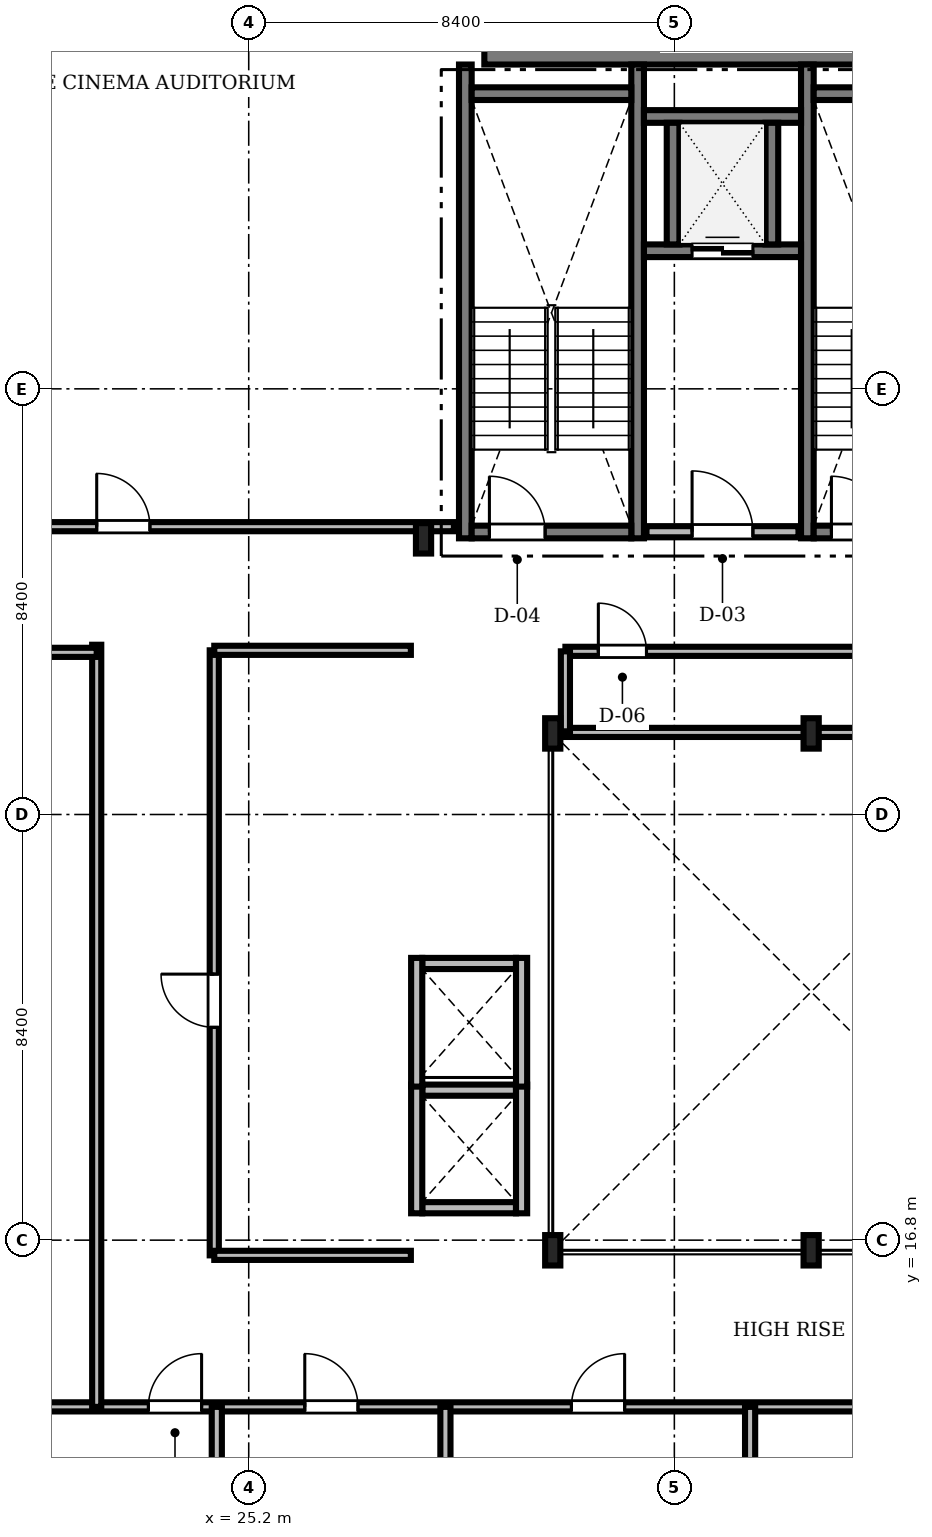
"""IFC4 building model, lengths in metres.
Left out: names, types, materials, properties, quantities, classifications, styles, units other than length and angle.
Written with IfcOpenShell. Run it as: python <this file> out.ifc"""

import sys

from ifc_helpers import new_model, si_unit, direction, frame, frame_2d, origin, origin_2d, place, context, subcontext, project, spatial, rectangle, i_section, extrude, source, transform, mapped, element, fill, save


model = new_model("IFC4")
c1 = context("Model", 3, precision=1e-05, world=origin(), true_north=direction((0.0, 1.0)))
c2 = subcontext(c1, "Body", "Model", "MODEL_VIEW")
j1 = project(units=[si_unit("LENGTHUNIT", "METRE"), si_unit("PLANEANGLEUNIT", "RADIAN")], contexts=[c1])
p1 = place(None, origin())
s1 = spatial("IfcSite", under=j1, at=p1, CompositionType="ELEMENT")
p2 = place(p1, origin())
s2 = spatial("IfcBuilding", under=s1, at=p2, CompositionType="ELEMENT")
p3 = place(p2, frame((0.0, 0.0, 246.65)))
s3 = spatial("IfcBuildingStorey", under=s2, at=p3, CompositionType="ELEMENT", Elevation=246.65)
m1 = source(origin(), c2, "Body", "SweptSolid", [
    extrude(rectangle(XDim=17.52, YDim=0.6, at=frame_2d((8.76, 0.0))), origin(), (0.0, 0.0, 1.0), 3.73),
])
p4 = place(p3, frame((29.85, 40.3, 0.0), z_axis=(0.0, 0.0, 1.0), x_axis=(1.0, 0.0, 0.0)))
e1 = element("IfcWall", 1, at=p4, inside=s3, PredefinedType="SHEAR", context=c2, shape_type="MappedRepresentation", body=[
    mapped(m1, transform((0.0, 0.0, 0.0), scale=1.0)),
])
m2 = source(origin(), c2, "Body", "SweptSolid", [
    extrude(i_section(OverallWidth=0.3, OverallDepth=0.6, WebThickness=0.015, FlangeThickness=0.03, FilletRadius=0.027, at=origin_2d()), origin(), (0.0, 0.0, 1.0), 3.73),
])
for number, where, z_axis, x_axis in (
    (2, (31.2, 16.6, 0.0), (0.0, 0.0, 1.0), (1.0, 0.0, 0.0)),
    (3, (36.3, 16.6, 0.0), (0.0, 0.0, 1.0), (1.0, 0.0, 0.0)),
    (4, (36.3, 26.8, 0.0), (0.0, 0.0, 1.0), (1.0, 0.0, 0.0)),
    (5, (31.2, 26.8, 0.0), (0.0, 0.0, 1.0), (1.0, 0.0, 0.0)),
    (6, (28.65, 30.65, 0.0), (0.0, 0.0, 1.0), (1.0, 0.0, 0.0)),
):
    element("IfcColumn", number, at=place(p3, frame(where, z_axis=z_axis, x_axis=x_axis)), inside=s3, PredefinedType="COLUMN", context=c2, shape_type="MappedRepresentation", body=[
        mapped(m2, transform((0.0, 0.0, 0.0), scale=1.0)),
    ])
m3 = source(origin(), c2, "Body", "SweptSolid", [
    extrude(rectangle(XDim=9.35, YDim=0.25, at=frame_2d((4.675, 0.0))), origin(), (0.0, 0.0, 1.0), 3.75),
])
for number, where, z_axis, x_axis in (
    (7, (29.475, 30.65, 0.0), (0.0, 0.0, 1.0), (0.0, 1.0, 0.0)),
    (8, (32.875, 30.65, 0.0), (0.0, 0.0, 1.0), (0.0, 1.0, 0.0)),
):
    element("IfcWall", number, at=place(p3, frame(where, z_axis=z_axis, x_axis=x_axis)), inside=s3, PredefinedType="SOLIDWALL", context=c2, shape_type="MappedRepresentation", body=[
        mapped(m3, transform((0.0, 0.0, 0.0), scale=1.0)),
    ])
m4 = source(origin(), c2, "Body", "SweptSolid", [
    extrude(rectangle(XDim=3.15, YDim=0.25, at=frame_2d((1.575, 0.0))), origin(), (0.0, 0.0, 1.0), 3.75),
])
p5 = place(p3, frame((29.6, 39.425, 0.0), z_axis=(0.0, 0.0, 1.0), x_axis=(1.0, 0.0, 0.0)))
e9 = element("IfcWall", 9, at=p5, inside=s3, PredefinedType="SOLIDWALL", context=c2, shape_type="MappedRepresentation", body=[
    mapped(m4, transform((0.0, 0.0, 0.0), scale=1.0)),
])
p6 = place(p3, frame((29.6, 30.775, 0.0), z_axis=(0.0, 0.0, 1.0), x_axis=(1.0, 0.0, 0.0)))
e10 = element("IfcWall", 10, at=p6, inside=s3, PredefinedType="SOLIDWALL", context=c2, shape_type="MappedRepresentation", body=[
    mapped(m4, transform((0.0, 0.0, 0.0), scale=1.0)),
])
m5 = source(origin(), c2, "Body", "SweptSolid", [
    extrude(rectangle(XDim=1.1, YDim=2.2, at=frame_2d((0.55, 1.1))), frame((0.0, 0.135, 0.0), z_axis=(0.0, -1.0, 0.0), x_axis=(1.0, 0.0, 0.0)), (0.0, 0.0, 1.0), 0.27),
])
p7 = place(p6, frame((0.35, 0.0, 0.0)))
e11 = element("IfcOpeningElement", 11, at=p7, cuts=e10, PredefinedType="OPENING", context=c2, shape_type="MappedRepresentation", body=[
    mapped(m5, transform((0.0, 0.0, 0.0), scale=1.0)),
])
p8 = place(p3, frame((36.225, 30.65, 0.0), z_axis=(0.0, 0.0, 1.0), x_axis=(0.0, 1.0, 0.0)))
e12 = element("IfcWall", 12, at=p8, inside=s3, PredefinedType="SOLIDWALL", context=c2, shape_type="MappedRepresentation", body=[
    mapped(m3, transform((0.0, 0.0, 0.0), scale=1.0)),
])
p9 = place(p3, frame((36.35, 39.425, 0.0), z_axis=(0.0, 0.0, 1.0), x_axis=(1.0, 0.0, 0.0)))
e13 = element("IfcWall", 13, at=p9, inside=s3, PredefinedType="SOLIDWALL", context=c2, shape_type="MappedRepresentation", body=[
    mapped(m4, transform((0.0, 0.0, 0.0), scale=1.0)),
])
p10 = place(p3, frame((36.35, 30.775, 0.0), z_axis=(0.0, 0.0, 1.0), x_axis=(1.0, 0.0, 0.0)))
e14 = element("IfcWall", 14, at=p10, inside=s3, PredefinedType="SOLIDWALL", context=c2, shape_type="MappedRepresentation", body=[
    mapped(m4, transform((0.0, 0.0, 0.0), scale=1.0)),
])
p11 = place(p10, frame((0.35, 0.0, 0.0)))
e15 = element("IfcOpeningElement", 15, at=p11, cuts=e14, PredefinedType="OPENING", context=c2, shape_type="MappedRepresentation", body=[
    mapped(m5, transform((0.0, 0.0, 0.0), scale=1.0)),
])
m6 = source(origin(), c2, "Body", "SweptSolid", [
    extrude(rectangle(XDim=3.0, YDim=0.22, at=frame_2d((1.5, 0.0))), origin(), (0.0, 0.0, 1.0), 3.73),
])
p12 = place(p3, frame((33.05, 30.78, 0.0), z_axis=(0.0, 0.0, 1.0), x_axis=(1.0, 0.0, 0.0)))
e16 = element("IfcWall", 16, at=p12, inside=s3, PredefinedType="SOLIDWALL", context=c2, shape_type="MappedRepresentation", body=[
    mapped(m6, transform((0.0, 0.0, 0.0), scale=1.0)),
])
m7 = source(origin(), c2, "Body", "SweptSolid", [
    extrude(rectangle(XDim=1.2, YDim=2.2, at=frame_2d((0.6, 1.1))), frame((0.0, 0.12, 0.0), z_axis=(0.0, -1.0, 0.0), x_axis=(1.0, 0.0, 0.0)), (0.0, 0.0, 1.0), 0.24),
])
p13 = place(p12, frame((0.9, 0.0, 0.0)))
e17 = element("IfcOpeningElement", 17, at=p13, cuts=e16, PredefinedType="OPENING", context=c2, shape_type="MappedRepresentation", body=[
    mapped(m7, transform((0.0, 0.0, 0.0), scale=1.0)),
])
m8 = source(origin(), c2, "Body", "SweptSolid", [
    extrude(rectangle(XDim=3.1, YDim=0.25, at=frame_2d((1.55, 0.0))), origin(), (0.0, 0.0, 1.0), 3.73),
])
p14 = place(p3, frame((33.0, 36.325, 0.0), z_axis=(0.0, 0.0, 1.0), x_axis=(1.0, 0.0, 0.0)))
e18 = element("IfcWall", 18, at=p14, inside=s3, PredefinedType="SOLIDWALL", context=c2, shape_type="MappedRepresentation", body=[
    mapped(m8, transform((0.0, 0.0, 0.0), scale=1.0)),
])
m9 = source(origin(), c2, "Body", "SweptSolid", [
    extrude(rectangle(XDim=1.2, YDim=2.25, at=frame_2d((0.6, 1.125))), frame((0.0, 0.135, 0.0), z_axis=(0.0, -1.0, 0.0), x_axis=(1.0, 0.0, 0.0)), (0.0, 0.0, 1.0), 0.27),
])
p15 = place(p14, frame((0.95, 0.0, 0.0)))
e19 = element("IfcOpeningElement", 19, at=p15, cuts=e18, PredefinedType="OPENING", context=c2, shape_type="MappedRepresentation", body=[
    mapped(m9, transform((0.0, 0.0, 0.0), scale=1.0)),
])
p16 = place(p3, frame((33.0, 38.975, 0.0), z_axis=(0.0, 0.0, 1.0), x_axis=(1.0, 0.0, 0.0)))
e20 = element("IfcWall", 20, at=p16, inside=s3, PredefinedType="SOLIDWALL", context=c2, shape_type="MappedRepresentation", body=[
    mapped(m8, transform((0.0, 0.0, 0.0), scale=1.0)),
])
m10 = source(origin(), c2, "Body", "SweptSolid", [
    extrude(rectangle(XDim=2.4, YDim=0.25, at=frame_2d((1.2, 0.0))), origin(), (0.0, 0.0, 1.0), 3.73),
])
for number, where, z_axis, x_axis in (
    (21, (33.575, 36.45, 0.0), (0.0, 0.0, 1.0), (0.0, 1.0, 0.0)),
    (22, (35.525, 36.45, 0.0), (0.0, 0.0, 1.0), (0.0, 1.0, 0.0)),
):
    element("IfcWall", number, at=place(p3, frame(where, z_axis=z_axis, x_axis=x_axis)), inside=s3, PredefinedType="SOLIDWALL", context=c2, shape_type="MappedRepresentation", body=[
        mapped(m10, transform((0.0, 0.0, 0.0), scale=1.0)),
    ])
m11 = source(origin(), c2, "Body", "SweptSolid", [
    extrude(rectangle(XDim=1.85, YDim=0.22, at=frame_2d((0.925, 0.0))), origin(), (0.0, 0.0, 1.0), 3.73),
])
for number, where, z_axis, x_axis in (
    (23, (28.625, 17.44, 0.0), (0.0, 0.0, 1.0), (1.0, 0.0, 0.0)),
    (24, (28.625, 19.76, 0.0), (0.0, 0.0, 1.0), (1.0, 0.0, 0.0)),
):
    element("IfcWall", number, at=place(p3, frame(where, z_axis=z_axis, x_axis=x_axis)), inside=s3, PredefinedType="SOLIDWALL", context=c2, shape_type="MappedRepresentation", body=[
        mapped(m11, transform((0.0, 0.0, 0.0), scale=1.0)),
    ])
m12 = source(origin(), c2, "Body", "SweptSolid", [
    extrude(rectangle(XDim=2.54, YDim=0.22, at=frame_2d((1.27, 0.0))), origin(), (0.0, 0.0, 1.0), 3.73),
])
for number, where, z_axis, x_axis in (
    (25, (28.515, 17.33, 0.0), (0.0, 0.0, 1.0), (0.0, 1.0, 0.0)),
    (26, (30.585, 17.33, 0.0), (0.0, 0.0, 1.0), (0.0, 1.0, 0.0)),
):
    element("IfcWall", number, at=place(p3, frame(where, z_axis=z_axis, x_axis=x_axis)), inside=s3, PredefinedType="SOLIDWALL", context=c2, shape_type="MappedRepresentation", body=[
        mapped(m12, transform((0.0, 0.0, 0.0), scale=1.0)),
    ])
p17 = place(p3, frame((28.625, 22.26, 0.0), z_axis=(0.0, 0.0, 1.0), x_axis=(1.0, 0.0, 0.0)))
e27 = element("IfcWall", 27, at=p17, inside=s3, PredefinedType="SOLIDWALL", context=c2, shape_type="MappedRepresentation", body=[
    mapped(m11, transform((0.0, 0.0, 0.0), scale=1.0)),
])
for number, where, z_axis, x_axis in (
    (28, (28.515, 19.83, 0.0), (0.0, 0.0, 1.0), (0.0, 1.0, 0.0)),
    (29, (30.585, 19.83, 0.0), (0.0, 0.0, 1.0), (0.0, 1.0, 0.0)),
):
    element("IfcWall", number, at=place(p3, frame(where, z_axis=z_axis, x_axis=x_axis)), inside=s3, PredefinedType="SOLIDWALL", context=c2, shape_type="MappedRepresentation", body=[
        mapped(m12, transform((0.0, 0.0, 0.0), scale=1.0)),
    ])
m13 = source(origin(), c2, "Body", "SweptSolid", [
    extrude(rectangle(XDim=46.156, YDim=0.18, at=frame_2d((23.078, 0.0))), origin(), (0.0, 0.0, 1.0), 2.972),
])
p18 = place(p3, frame((15.922, 13.51, 0.0), z_axis=(0.0, 0.0, 1.0), x_axis=(1.0, 0.0, 0.0)))
e30 = element("IfcWall", 30, at=p18, inside=s3, PredefinedType="PARTITIONING", context=c2, shape_type="MappedRepresentation", body=[
    mapped(m13, transform((0.0, 0.0, 0.0), scale=1.0)),
])
m14 = source(origin(), c2, "Body", "SweptSolid", [
    extrude(rectangle(XDim=1.05, YDim=2.2, at=frame_2d((0.525, 1.1))), frame((0.0, 0.1, 0.0), z_axis=(0.0, -1.0, 0.0), x_axis=(1.0, 0.0, 0.0)), (0.0, 0.0, 1.0), 0.2),
])
p19 = place(p18, frame((7.298, 0.0, 0.0)))
e31 = element("IfcOpeningElement", 31, at=p19, cuts=e30, PredefinedType="OPENING", context=c2, shape_type="MappedRepresentation", body=[
    mapped(m14, transform((0.0, 0.0, 0.0), scale=1.0)),
])
p20 = place(p18, frame((10.384, 0.0, 0.0)))
e32 = element("IfcOpeningElement", 32, at=p20, cuts=e30, PredefinedType="OPENING", context=c2, shape_type="MappedRepresentation", body=[
    mapped(m14, transform((0.0, 0.0, 0.0), scale=1.0)),
])
p21 = place(p18, frame((15.647, 0.0, 0.0)))
e33 = element("IfcOpeningElement", 33, at=p21, cuts=e30, PredefinedType="OPENING", context=c2, shape_type="MappedRepresentation", body=[
    mapped(m14, transform((0.0, 0.0, 0.0), scale=1.0)),
])
p22 = place(p18, frame((21.659, 0.0, 0.0)))
e34 = element("IfcOpeningElement", 34, at=p22, cuts=e30, PredefinedType="OPENING", context=c2, shape_type="MappedRepresentation", body=[
    mapped(m14, transform((0.0, 0.0, 0.0), scale=1.0)),
])
p23 = place(p18, frame((28.422, 0.0, 0.0)))
e35 = element("IfcOpeningElement", 35, at=p23, cuts=e30, PredefinedType="OPENING", context=c2, shape_type="MappedRepresentation", body=[
    mapped(m14, transform((0.0, 0.0, 0.0), scale=1.0)),
])
p24 = place(p18, frame((33.798, 0.0, 0.0)))
e36 = element("IfcOpeningElement", 36, at=p24, cuts=e30, PredefinedType="OPENING", context=c2, shape_type="MappedRepresentation", body=[
    mapped(m14, transform((0.0, 0.0, 0.0), scale=1.0)),
])
m15 = source(origin(), c2, "Body", "SweptSolid", [
    extrude(rectangle(XDim=13.328, YDim=0.18, at=frame_2d((6.664, 0.0))), origin(), (0.0, 0.0, 1.0), 2.972),
])
p25 = place(p3, frame((15.922, 30.88, 0.0), z_axis=(0.0, 0.0, 1.0), x_axis=(1.0, 0.0, 0.0)))
e37 = element("IfcWall", 37, at=p25, inside=s3, PredefinedType="PARTITIONING", context=c2, shape_type="MappedRepresentation", body=[
    mapped(m15, transform((0.0, 0.0, 0.0), scale=1.0)),
])
p26 = place(p25, frame((6.278, 0.0, 0.0)))
e38 = element("IfcOpeningElement", 38, at=p26, cuts=e37, PredefinedType="OPENING", context=c2, shape_type="MappedRepresentation", body=[
    mapped(m14, transform((0.0, 0.0, 0.0), scale=1.0)),
])
m16 = source(origin(), c2, "Body", "SweptSolid", [
    extrude(rectangle(XDim=11.94, YDim=0.18, at=frame_2d((5.97, 0.0))), origin(), (0.0, 0.0, 1.0), 3.172),
])
p27 = place(p3, frame((24.52, 16.5, 0.0), z_axis=(0.0, 0.0, 1.0), x_axis=(0.0, 1.0, 0.0)))
e39 = element("IfcWall", 39, at=p27, inside=s3, PredefinedType="PARTITIONING", context=c2, shape_type="MappedRepresentation", body=[
    mapped(m16, transform((0.0, 0.0, 0.0), scale=1.0)),
])
p28 = place(p27, frame((4.5, 0.0, 0.0)))
e40 = element("IfcOpeningElement", 40, at=p28, cuts=e39, PredefinedType="OPENING", context=c2, shape_type="MappedRepresentation", body=[
    mapped(m14, transform((0.0, 0.0, 0.0), scale=1.0)),
])
m17 = source(origin(), c2, "Body", "SweptSolid", [
    extrude(rectangle(XDim=7.33, YDim=0.18, at=frame_2d((3.665, 0.0))), origin(), (0.0, 0.0, 1.0), 3.362),
])
p29 = place(p3, frame((31.45, 28.42, 0.0), z_axis=(0.0, 0.0, 1.0), x_axis=(1.0, 0.0, 0.0)))
e41 = element("IfcWall", 41, at=p29, inside=s3, PredefinedType="PARTITIONING", context=c2, shape_type="MappedRepresentation", body=[
    mapped(m17, transform((0.0, 0.0, 0.0), scale=1.0)),
])
m18 = source(origin(), c2, "Body", "SweptSolid", [
    extrude(rectangle(XDim=0.95, YDim=2.15, at=frame_2d((0.475, 1.075))), frame((0.0, 0.1, 0.0), z_axis=(0.0, -1.0, 0.0), x_axis=(1.0, 0.0, 0.0)), (0.0, 0.0, 1.0), 0.2),
])
p30 = place(p29, frame((0.65, 0.0, 0.0)))
e42 = element("IfcOpeningElement", 42, at=p30, cuts=e41, PredefinedType="OPENING", context=c2, shape_type="MappedRepresentation", body=[
    mapped(m18, transform((0.0, 0.0, 0.0), scale=1.0)),
])
m19 = source(origin(), c2, "Body", "SweptSolid", [
    extrude(rectangle(XDim=15.04, YDim=0.18, at=frame_2d((7.52, 0.0))), origin(), (0.0, 0.0, 1.0), 3.172),
])
p31 = place(p3, frame((22.2, 13.51, 0.0), z_axis=(0.0, 0.0, 1.0), x_axis=(0.0, 1.0, 0.0)))
e43 = element("IfcWall", 43, at=p31, inside=s3, PredefinedType="PARTITIONING", context=c2, shape_type="MappedRepresentation", body=[
    mapped(m19, transform((0.0, 0.0, 0.0), scale=1.0)),
])
m20 = source(origin(), c2, "Body", "SweptSolid", [
    extrude(rectangle(XDim=11.388, YDim=0.2, at=frame_2d((5.694, 0.0))), origin(), (0.0, 0.0, 1.0), 2.972),
])
for number, where, z_axis, x_axis in (
    (44, (24.57, 2.122, 0.0), (0.0, 0.0, 1.0), (0.0, 1.0, 0.0)),
    (45, (29.082, 2.122, 0.0), (0.0, 0.0, 1.0), (0.0, 1.0, 0.0)),
    (46, (35.095, 2.122, 0.0), (0.0, 0.0, 1.0), (0.0, 1.0, 0.0)),
):
    element("IfcWall", number, at=place(p3, frame(where, z_axis=z_axis, x_axis=x_axis)), inside=s3, PredefinedType="PARTITIONING", context=c2, shape_type="MappedRepresentation", body=[
        mapped(m20, transform((0.0, 0.0, 0.0), scale=1.0)),
    ])
m21 = source(origin(), c2, "Body", "SweptSolid", [
    extrude(rectangle(XDim=7.33, YDim=0.18, at=frame_2d((3.665, 0.0))), origin(), (0.0, 0.0, 1.0), 3.272),
])
p32 = place(p3, frame((31.45, 26.82, 0.0), z_axis=(0.0, 0.0, 1.0), x_axis=(1.0, 0.0, 0.0)))
e47 = element("IfcWall", 47, at=p32, inside=s3, PredefinedType="PARTITIONING", context=c2, shape_type="MappedRepresentation", body=[
    mapped(m21, transform((0.0, 0.0, 0.0), scale=1.0)),
])
m22 = source(origin(), c2, "Body", "SweptSolid", [
    extrude(rectangle(XDim=6.47, YDim=0.18, at=frame_2d((3.235, 0.0))), origin(), (0.0, 0.0, 1.0), 2.972),
])
p33 = place(p3, frame((15.73, 28.4, 0.0), z_axis=(0.0, 0.0, 1.0), x_axis=(1.0, 0.0, 0.0)))
e48 = element("IfcWall", 48, at=p33, inside=s3, PredefinedType="PARTITIONING", context=c2, shape_type="MappedRepresentation", body=[
    mapped(m22, transform((0.0, 0.0, 0.0), scale=1.0)),
])
m23 = source(origin(), c2, "Body", "SweptSolid", [
    extrude(rectangle(XDim=3.88, YDim=0.18, at=frame_2d((1.94, 0.0))), origin(), (0.0, 0.0, 1.0), 3.73),
])
for number, where, z_axis, x_axis in (
    (49, (24.52, 16.5, 0.0), (0.0, 0.0, 1.0), (1.0, 0.0, 0.0)),
    (50, (24.52, 28.44, 0.0), (0.0, 0.0, 1.0), (1.0, 0.0, 0.0)),
):
    element("IfcWall", number, at=place(p3, frame(where, z_axis=z_axis, x_axis=x_axis)), inside=s3, PredefinedType="PARTITIONING", context=c2, shape_type="MappedRepresentation", body=[
        mapped(m23, transform((0.0, 0.0, 0.0), scale=1.0)),
    ])
m24 = source(origin(), c2, "Body", "SweptSolid", [
    extrude(rectangle(XDim=1.6, YDim=0.18, at=frame_2d((0.8, 0.0))), origin(), (0.0, 0.0, 1.0), 3.272),
])
p34 = place(p3, frame((31.45, 26.82, 0.0), z_axis=(0.0, 0.0, 1.0), x_axis=(0.0, 1.0, 0.0)))
e51 = element("IfcWall", 51, at=p34, inside=s3, PredefinedType="PARTITIONING", context=c2, shape_type="MappedRepresentation", body=[
    mapped(m24, transform((0.0, 0.0, 0.0), scale=1.0)),
])
m25 = source(origin(), c2, "Body", "SweptSolid", [
    extrude(rectangle(XDim=1.1, YDim=2.2, at=frame_2d((0.55, 1.1))), frame((0.0, 0.025, 0.0), z_axis=(0.0, -1.0, 0.0), x_axis=(1.0, 0.0, 0.0)), (0.0, 0.0, 1.0), 0.05),
])
p35 = place(p7, origin())
e52 = element("IfcDoor", 52, at=p35, inside=s3, OperationType="SINGLE_SWING_LEFT", PredefinedType="DOOR", context=c2, shape_type="MappedRepresentation", body=[
    mapped(m25, transform((0.0, 0.0, 0.0), scale=1.0)),
])
fill(e11, e52)
p36 = place(p11, origin())
e53 = element("IfcDoor", 53, at=p36, inside=s3, OperationType="SINGLE_SWING_LEFT", PredefinedType="DOOR", context=c2, shape_type="MappedRepresentation", body=[
    mapped(m25, transform((0.0, 0.0, 0.0), scale=1.0)),
])
fill(e15, e53)
m26 = source(origin(), c2, "Body", "SweptSolid", [
    extrude(rectangle(XDim=1.2, YDim=2.2, at=frame_2d((0.6, 1.1))), frame((0.0, 0.025, 0.0), z_axis=(0.0, -1.0, 0.0), x_axis=(1.0, 0.0, 0.0)), (0.0, 0.0, 1.0), 0.05),
])
p37 = place(p13, origin())
e54 = element("IfcDoor", 54, at=p37, inside=s3, OperationType="SINGLE_SWING_LEFT", PredefinedType="DOOR", context=c2, shape_type="MappedRepresentation", body=[
    mapped(m26, transform((0.0, 0.0, 0.0), scale=1.0)),
])
fill(e17, e54)
m27 = source(origin(), c2, "Body", "SweptSolid", [
    extrude(rectangle(XDim=1.2, YDim=2.25, at=frame_2d((0.6, 1.125))), frame((0.0, 0.025, 0.0), z_axis=(0.0, -1.0, 0.0), x_axis=(1.0, 0.0, 0.0)), (0.0, 0.0, 1.0), 0.05),
])
p38 = place(p15, origin())
e55 = element("IfcDoor", 55, at=p38, inside=s3, OperationType="DOUBLE_DOOR_SLIDING", PredefinedType="DOOR", context=c2, shape_type="MappedRepresentation", body=[
    mapped(m27, transform((0.0, 0.0, 0.0), scale=1.0)),
])
fill(e19, e55)
m28 = source(origin(), c2, "Body", "SweptSolid", [
    extrude(rectangle(XDim=1.05, YDim=2.2, at=frame_2d((0.525, 1.1))), frame((0.0, 0.025, 0.0), z_axis=(0.0, -1.0, 0.0), x_axis=(1.0, 0.0, 0.0)), (0.0, 0.0, 1.0), 0.05),
])
p39 = place(p19, origin())
e56 = element("IfcDoor", 56, at=p39, inside=s3, OperationType="SINGLE_SWING_RIGHT", PredefinedType="DOOR", context=c2, shape_type="MappedRepresentation", body=[
    mapped(m28, transform((0.0, 0.0, 0.0), scale=1.0)),
])
fill(e31, e56)
p40 = place(p20, origin())
e57 = element("IfcDoor", 57, at=p40, inside=s3, OperationType="SINGLE_SWING_LEFT", PredefinedType="DOOR", context=c2, shape_type="MappedRepresentation", body=[
    mapped(m28, transform((0.0, 0.0, 0.0), scale=1.0)),
])
fill(e32, e57)
p41 = place(p21, origin())
e58 = element("IfcDoor", 58, at=p41, inside=s3, OperationType="SINGLE_SWING_RIGHT", PredefinedType="DOOR", context=c2, shape_type="MappedRepresentation", body=[
    mapped(m28, transform((0.0, 0.0, 0.0), scale=1.0)),
])
fill(e33, e58)
p42 = place(p26, origin())
e59 = element("IfcDoor", 59, at=p42, inside=s3, OperationType="SINGLE_SWING_LEFT", PredefinedType="DOOR", context=c2, shape_type="MappedRepresentation", body=[
    mapped(m28, transform((0.0, 0.0, 0.0), scale=1.0)),
])
fill(e38, e59)
p43 = place(p28, origin())
e60 = element("IfcDoor", 60, at=p43, inside=s3, OperationType="SINGLE_SWING_RIGHT", PredefinedType="DOOR", context=c2, shape_type="MappedRepresentation", body=[
    mapped(m28, transform((0.0, 0.0, 0.0), scale=1.0)),
])
fill(e40, e60)
m29 = source(origin(), c2, "Body", "SweptSolid", [
    extrude(rectangle(XDim=0.95, YDim=2.15, at=frame_2d((0.475, 1.075))), frame((0.0, 0.025, 0.0), z_axis=(0.0, -1.0, 0.0), x_axis=(1.0, 0.0, 0.0)), (0.0, 0.0, 1.0), 0.05),
])
p44 = place(p30, origin())
e61 = element("IfcDoor", 61, at=p44, inside=s3, OperationType="SINGLE_SWING_LEFT", PredefinedType="DOOR", context=c2, shape_type="MappedRepresentation", body=[
    mapped(m29, transform((0.0, 0.0, 0.0), scale=1.0)),
])
fill(e42, e61)
save(model, sys.argv[1])
